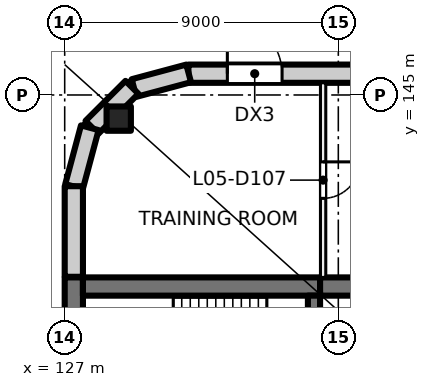
"""IFC4 building model, lengths in metres.
Left out: names, types, materials, properties, quantities, classifications, styles, units other than length and angle.
Written with IfcOpenShell. Run it as: python <this file> out.ifc"""

import sys

from ifc_helpers import new_model, si_unit, direction, frame, frame_2d, origin, origin_2d, place, context, subcontext, project, spatial, rectangle, extrude, element, fill, save


model = new_model("IFC4")
c1 = context("Model", 3, precision=1e-05, world=origin(), true_north=direction((0.0, 1.0)))
c2 = subcontext(c1, "Body", "Model", "MODEL_VIEW")
j1 = project(units=[si_unit("LENGTHUNIT", "METRE"), si_unit("PLANEANGLEUNIT", "RADIAN")], contexts=[c1])
p1 = place(None, origin())
s1 = spatial("IfcSite", under=j1, at=p1, CompositionType="ELEMENT")
p2 = place(p1, origin())
s2 = spatial("IfcBuilding", under=s1, at=p2, CompositionType="ELEMENT")
p3 = place(p2, frame((0.0, 0.0, 27.5)))
s3 = spatial("IfcBuildingStorey", under=s2, at=p3, CompositionType="ELEMENT", Elevation=27.5)
p4 = place(p3, frame((128.777, 144.223, 0.0), z_axis=(0.0, 0.0, 1.0), x_axis=(1.0, 0.0, 0.0)))
e1 = element("IfcColumn", 1, at=p4, inside=s3, PredefinedType="COLUMN", context=c2, shape_type="SweptSolid", body=[
    extrude(rectangle(XDim=0.8, YDim=0.8, at=origin_2d()), origin(), (0.0, 0.0, 1.0), 4.0),
])
p5 = place(p3, frame((127.3, 135.2, 0.0), z_axis=(0.0, 0.0, 1.0), x_axis=(0.0, 1.0, 0.0)))
e2 = element("IfcWall", 2, at=p5, inside=s3, PredefinedType="SHEAR", context=c2, shape_type="SweptSolid", body=[
    extrude(rectangle(XDim=3.8, YDim=0.6, at=frame_2d((1.9, 0.0))), origin(), (0.0, 0.0, 1.0), 4.0),
])
p6 = place(p3, frame((127.6, 138.7, 0.0), z_axis=(0.0, 0.0, 1.0), x_axis=(1.0, 0.0, 0.0)))
e3 = element("IfcWall", 3, at=p6, inside=s3, PredefinedType="SHEAR", context=c2, shape_type="SweptSolid", body=[
    extrude(rectangle(XDim=7.8, YDim=0.6, at=frame_2d((3.9, 0.0))), origin(), (0.0, 0.0, 1.0), 4.0),
])
p7 = place(p3, frame((135.4, 138.7, 0.0), z_axis=(0.0, 0.0, 1.0), x_axis=(1.0, 0.0, 0.0)))
e4 = element("IfcWall", 4, at=p7, inside=s3, PredefinedType="SHEAR", context=c2, shape_type="SweptSolid", body=[
    extrude(rectangle(XDim=4.6, YDim=0.6, at=frame_2d((2.3, 0.0))), origin(), (0.0, 0.0, 1.0), 4.0),
])
p8 = place(p3, frame((135.2, 135.6, 0.0), z_axis=(0.0, 0.0, 1.0), x_axis=(0.0, 1.0, 0.0)))
e5 = element("IfcWall", 5, at=p8, inside=s3, PredefinedType="SHEAR", context=c2, shape_type="SweptSolid", body=[
    extrude(rectangle(XDim=2.8, YDim=0.4, at=frame_2d((1.4, 0.0))), origin(), (0.0, 0.0, 1.0), 4.0),
])
p9 = place(p8, frame((0.9, 0.0, 0.0)))
e6 = element("IfcOpeningElement", 6, at=p9, cuts=e5, PredefinedType="OPENING", context=c2, shape_type="SweptSolid", body=[
    extrude(rectangle(XDim=1.0, YDim=2.1, at=frame_2d((0.5, 1.05))), frame((0.0, 0.21, 0.0), z_axis=(0.0, -1.0, 0.0), x_axis=(1.0, 0.0, 0.0)), (0.0, 0.0, 1.0), 0.42),
])
p10 = place(p3, frame((131.07, 145.7, 0.0), z_axis=(0.0, 0.0, 1.0), x_axis=(1.0, 0.0, 0.0)))
e7 = element("IfcWall", 7, at=p10, inside=s3, PredefinedType="SOLIDWALL", context=c2, shape_type="SweptSolid", body=[
    extrude(rectangle(XDim=31.93, YDim=0.6, at=frame_2d((15.965, 0.0))), origin(), (0.0, 0.0, 1.0), 3.625),
])
p11 = place(p10, frame((1.28, 0.0, 0.0)))
e8 = element("IfcOpeningElement", 8, at=p11, cuts=e7, PredefinedType="OPENING", context=c2, shape_type="SweptSolid", body=[
    extrude(rectangle(XDim=1.8, YDim=2.4, at=frame_2d((0.9, 1.2))), frame((0.0, 0.31, 0.0), z_axis=(0.0, -1.0, 0.0), x_axis=(1.0, 0.0, 0.0)), (0.0, 0.0, 1.0), 0.62),
])
p12 = place(p10, frame((5.48, 0.0, 0.9)))
e9 = element("IfcOpeningElement", 9, at=p12, cuts=e7, PredefinedType="OPENING", context=c2, shape_type="SweptSolid", body=[
    extrude(rectangle(XDim=2.4, YDim=2.4, at=frame_2d((1.2, 1.2))), frame((0.0, 0.31, 0.0), z_axis=(0.0, -1.0, 0.0), x_axis=(1.0, 0.0, 0.0)), (0.0, 0.0, 1.0), 0.62),
])
p13 = place(p10, frame((9.98, 0.0, 0.9)))
e10 = element("IfcOpeningElement", 10, at=p13, cuts=e7, PredefinedType="OPENING", context=c2, shape_type="SweptSolid", body=[
    extrude(rectangle(XDim=2.4, YDim=2.4, at=frame_2d((1.2, 1.2))), frame((0.0, 0.31, 0.0), z_axis=(0.0, -1.0, 0.0), x_axis=(1.0, 0.0, 0.0)), (0.0, 0.0, 1.0), 0.62),
])
p14 = place(p10, frame((14.48, 0.0, 0.9)))
e11 = element("IfcOpeningElement", 11, at=p14, cuts=e7, PredefinedType="OPENING", context=c2, shape_type="SweptSolid", body=[
    extrude(rectangle(XDim=2.4, YDim=2.4, at=frame_2d((1.2, 1.2))), frame((0.0, 0.31, 0.0), z_axis=(0.0, -1.0, 0.0), x_axis=(1.0, 0.0, 0.0)), (0.0, 0.0, 1.0), 0.62),
])
p15 = place(p10, frame((19.28, 0.0, 0.0)))
e12 = element("IfcOpeningElement", 12, at=p15, cuts=e7, PredefinedType="OPENING", context=c2, shape_type="SweptSolid", body=[
    extrude(rectangle(XDim=1.8, YDim=2.4, at=frame_2d((0.9, 1.2))), frame((0.0, 0.31, 0.0), z_axis=(0.0, -1.0, 0.0), x_axis=(1.0, 0.0, 0.0)), (0.0, 0.0, 1.0), 0.62),
])
p16 = place(p10, frame((23.48, 0.0, 0.9)))
e13 = element("IfcOpeningElement", 13, at=p16, cuts=e7, PredefinedType="OPENING", context=c2, shape_type="SweptSolid", body=[
    extrude(rectangle(XDim=2.4, YDim=2.4, at=frame_2d((1.2, 1.2))), frame((0.0, 0.31, 0.0), z_axis=(0.0, -1.0, 0.0), x_axis=(1.0, 0.0, 0.0)), (0.0, 0.0, 1.0), 0.62),
])
p17 = place(p10, frame((27.98, 0.0, 0.9)))
e14 = element("IfcOpeningElement", 14, at=p17, cuts=e7, PredefinedType="OPENING", context=c2, shape_type="SweptSolid", body=[
    extrude(rectangle(XDim=2.4, YDim=2.4, at=frame_2d((1.2, 1.2))), frame((0.0, 0.31, 0.0), z_axis=(0.0, -1.0, 0.0), x_axis=(1.0, 0.0, 0.0)), (0.0, 0.0, 1.0), 0.62),
])
for number, where, z_axis, x_axis in (
    (15, (129.281, 145.229, 0.0), (0.0, 0.0, 1.0), (0.966, 0.259, 0.0)),
    (16, (127.896, 143.936, 0.0), (0.0, 0.0, 1.0), (0.707, 0.707, 0.0)),
):
    element("IfcWall", number, at=place(p3, frame(where, z_axis=z_axis, x_axis=x_axis)), inside=s3, PredefinedType="SOLIDWALL", context=c2, shape_type="SweptSolid", body=[
        extrude(rectangle(XDim=1.861, YDim=0.6, at=frame_2d((0.93, 0.0))), origin(), (0.0, 0.0, 1.0), 3.625),
    ])
p18 = place(p3, frame((127.308, 141.99, 0.0), z_axis=(0.0, 0.0, 1.0), x_axis=(0.258839784042, 0.965920269068, 0.0)))
e17 = element("IfcWall", 17, at=p18, inside=s3, PredefinedType="SOLIDWALL", context=c2, shape_type="SweptSolid", body=[
    extrude(rectangle(XDim=2.0, YDim=0.6, at=frame_2d((1.0, 0.0))), origin(), (0.0, 0.0, 1.0), 3.625),
])
p19 = place(p3, frame((127.3, 139.02, 0.0), z_axis=(0.0, 0.0, 1.0), x_axis=(0.0, 1.0, 0.0)))
e18 = element("IfcWall", 18, at=p19, inside=s3, PredefinedType="SOLIDWALL", context=c2, shape_type="SweptSolid", body=[
    extrude(rectangle(XDim=2.98, YDim=0.6, at=frame_2d((1.49, 0.0))), origin(), (0.0, 0.0, 1.0), 3.625),
])
p20 = place(p3, frame((135.5, 145.4, 0.0), z_axis=(0.0, 0.0, 1.0), x_axis=(0.0, -1.0, 0.0)))
e19 = element("IfcWall", 19, at=p20, inside=s3, PredefinedType="PARTITIONING", context=c2, shape_type="SweptSolid", body=[
    extrude(rectangle(XDim=6.4, YDim=0.175, at=frame_2d((3.2, 0.0))), origin(), (0.0, 0.0, 1.0), 3.625),
])
p21 = place(p20, frame((2.6, 0.0, 0.0)))
e20 = element("IfcOpeningElement", 20, at=p21, cuts=e19, PredefinedType="OPENING", context=c2, shape_type="SweptSolid", body=[
    extrude(rectangle(XDim=1.2, YDim=2.1, at=frame_2d((0.6, 1.05))), frame((0.0, 0.097, 0.0), z_axis=(0.0, -1.0, 0.0), x_axis=(1.0, 0.0, 0.0)), (0.0, 0.0, 1.0), 0.195),
])
p22 = place(p11, origin())
e21 = element("IfcDoor", 21, at=p22, inside=s3, OperationType="DOUBLE_DOOR_SINGLE_SWING", PredefinedType="DOOR", context=c2, shape_type="SweptSolid", body=[
    extrude(rectangle(XDim=1.8, YDim=2.4, at=frame_2d((0.9, 1.2))), frame((0.0, 0.025, 0.0), z_axis=(0.0, -1.0, 0.0), x_axis=(1.0, 0.0, 0.0)), (0.0, 0.0, 1.0), 0.05),
])
fill(e8, e21)
p23 = place(p21, origin())
e22 = element("IfcDoor", 22, at=p23, inside=s3, OperationType="DOUBLE_DOOR_SINGLE_SWING", PredefinedType="DOOR", context=c2, shape_type="SweptSolid", body=[
    extrude(rectangle(XDim=1.2, YDim=2.1, at=frame_2d((0.6, 1.05))), frame((0.0, 0.025, 0.0), z_axis=(0.0, -1.0, 0.0), x_axis=(1.0, 0.0, 0.0)), (0.0, 0.0, 1.0), 0.05),
])
fill(e20, e22)
save(model, sys.argv[1])
